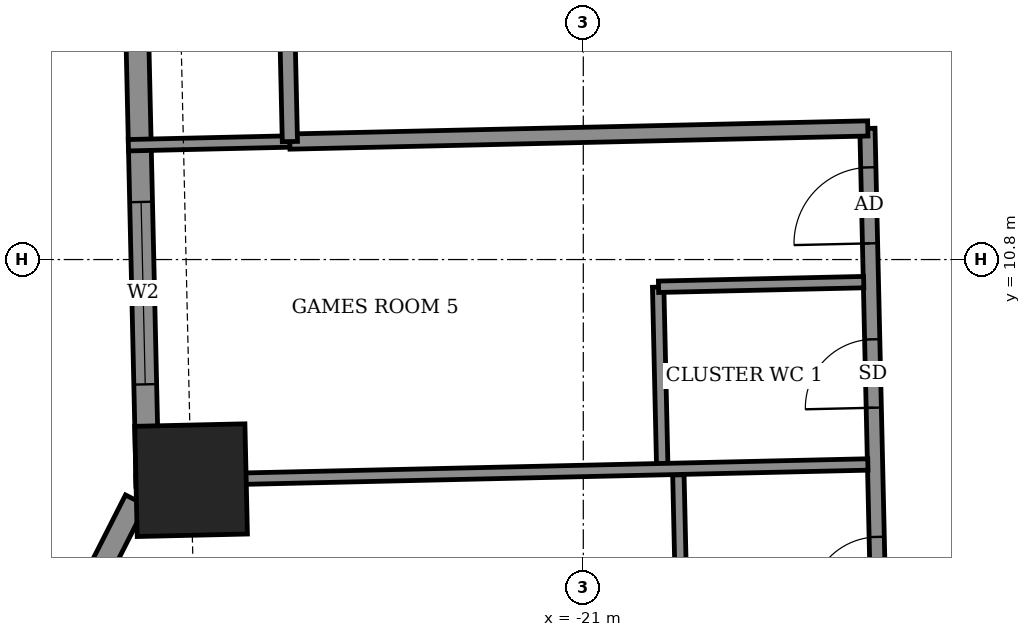
"""IFC4 building model, lengths in metres.
Left out: names, types, materials, properties, quantities, classifications, styles, units other than length and angle.
Written with IfcOpenShell. Run it as: python <this file> out.ifc"""

import sys

from ifc_helpers import new_model, si_unit, direction, frame, frame_2d, origin, origin_2d, place, context, subcontext, project, spatial, rectangle, extrude, element, fill, save


model = new_model("IFC4")
c1 = context("Model", 3, precision=1e-05, world=origin(), true_north=direction((0.0, 1.0)))
c2 = subcontext(c1, "Body", "Model", "MODEL_VIEW")
j1 = project(units=[si_unit("LENGTHUNIT", "METRE"), si_unit("PLANEANGLEUNIT", "RADIAN")], contexts=[c1])
p1 = place(None, origin())
s1 = spatial("IfcSite", under=j1, at=p1, CompositionType="ELEMENT")
p2 = place(p1, origin())
s2 = spatial("IfcBuilding", under=s1, at=p2, CompositionType="ELEMENT")
p3 = place(p2, frame((0.0, 0.0, 79.3)))
s3 = spatial("IfcBuildingStorey", under=s2, at=p3, CompositionType="ELEMENT", Elevation=79.3)
p4 = place(p3, frame((-26.16, 7.897, -0.55), z_axis=(0.0, 0.0, 1.0), x_axis=(0.022675887158, -0.999742869013, 0.0)))
e1 = element("IfcColumn", 1, at=p4, inside=s3, PredefinedType="COLUMN", context=c2, shape_type="SweptSolid", body=[
    extrude(rectangle(XDim=1.45, YDim=1.45, at=origin_2d()), origin(), (0.0, 0.0, 1.0), 3.6),
])
p5 = place(p3, frame((-27.036, 21.155, 0.0), z_axis=(0.0, 0.0, 1.0), x_axis=(0.022730142562, -0.999741636934, 0.0)))
e2 = element("IfcWall", 2, at=p5, inside=s3, PredefinedType="SOLIDWALL", context=c2, shape_type="SweptSolid", body=[
    extrude(rectangle(XDim=13.329, YDim=0.3, at=frame_2d((6.665, 0.0))), origin(), (0.0, 0.0, 1.0), 3.05),
])
p6 = place(p5, frame((2.818, 0.0, 0.0)))
e3 = element("IfcOpeningElement", 3, at=p6, cuts=e2, PredefinedType="OPENING", context=c2, shape_type="SweptSolid", body=[
    extrude(rectangle(XDim=1.5, YDim=2.4, at=frame_2d((0.75, 1.2))), frame((0.0, 0.16, 0.0), z_axis=(0.0, -1.0, 0.0), x_axis=(1.0, 0.0, 0.0)), (0.0, 0.0, 1.0), 0.32),
])
p7 = place(p5, frame((9.6, 0.0, 0.9)))
e4 = element("IfcOpeningElement", 4, at=p7, cuts=e2, PredefinedType="OPENING", context=c2, shape_type="SweptSolid", body=[
    extrude(rectangle(XDim=2.4, YDim=1.5, at=frame_2d((1.2, 0.75))), frame((0.0, 0.16, 0.0), z_axis=(0.0, -1.0, 0.0), x_axis=(1.0, 0.0, 0.0)), (0.0, 0.0, 1.0), 0.32),
])
p8 = place(p3, frame((-26.889, 7.635, 0.0), z_axis=(0.0, 0.0, 1.0), x_axis=(-0.452633159278, -0.891696822425, 0.0)))
e5 = element("IfcWall", 5, at=p8, inside=s3, PredefinedType="SOLIDWALL", context=c2, shape_type="SweptSolid", body=[
    extrude(rectangle(XDim=5.397, YDim=0.3, at=frame_2d((2.699, 0.0))), origin(), (0.0, 0.0, 1.0), 3.05),
])
p9 = place(p8, frame((2.007, 0.0, 0.9)))
e6 = element("IfcOpeningElement", 6, at=p9, cuts=e5, PredefinedType="OPENING", context=c2, shape_type="SweptSolid", body=[
    extrude(rectangle(XDim=1.2, YDim=1.5, at=frame_2d((0.6, 0.75))), frame((0.0, 0.16, 0.0), z_axis=(0.0, -1.0, 0.0), x_axis=(1.0, 0.0, 0.0)), (0.0, 0.0, 1.0), 0.32),
])
p10 = place(p3, frame((-16.684, -12.919, 0.0), z_axis=(0.0, 0.0, 1.0), x_axis=(-0.022706151961, 0.999742182097, 0.0)))
e7 = element("IfcWall", 7, at=p10, inside=s3, PredefinedType="PARTITIONING", context=c2, shape_type="SweptSolid", body=[
    extrude(rectangle(XDim=25.45, YDim=0.2, at=frame_2d((12.725, 0.0))), origin(), (0.0, 0.0, 1.0), 3.05),
])
p11 = place(p10, frame((23.938, 0.0, 0.0)))
e8 = element("IfcOpeningElement", 8, at=p11, cuts=e7, PredefinedType="OPENING", context=c2, shape_type="SweptSolid", body=[
    extrude(rectangle(XDim=1.0, YDim=2.1, at=frame_2d((0.5, 1.05))), frame((0.0, 0.11, 0.0), z_axis=(0.0, -1.0, 0.0), x_axis=(1.0, 0.0, 0.0)), (0.0, 0.0, 1.0), 0.22),
])
p12 = place(p10, frame((21.775, 0.0, 0.0)))
e9 = element("IfcOpeningElement", 9, at=p12, cuts=e7, PredefinedType="OPENING", context=c2, shape_type="SweptSolid", body=[
    extrude(rectangle(XDim=0.9, YDim=2.1, at=frame_2d((0.45, 1.05))), frame((0.0, 0.11, 0.0), z_axis=(0.0, -1.0, 0.0), x_axis=(1.0, 0.0, 0.0)), (0.0, 0.0, 1.0), 0.22),
])
p13 = place(p10, frame((16.825, 0.0, 0.0)))
e10 = element("IfcOpeningElement", 10, at=p13, cuts=e7, PredefinedType="OPENING", context=c2, shape_type="SweptSolid", body=[
    extrude(rectangle(XDim=1.0, YDim=2.1, at=frame_2d((0.5, 1.05))), frame((0.0, 0.11, 0.0), z_axis=(0.0, -1.0, 0.0), x_axis=(1.0, 0.0, 0.0)), (0.0, 0.0, 1.0), 0.22),
])
p14 = place(p10, frame((19.175, 0.0, 0.0)))
e11 = element("IfcOpeningElement", 11, at=p14, cuts=e7, PredefinedType="OPENING", context=c2, shape_type="SweptSolid", body=[
    extrude(rectangle(XDim=0.9, YDim=2.1, at=frame_2d((0.45, 1.05))), frame((0.0, 0.11, 0.0), z_axis=(0.0, -1.0, 0.0), x_axis=(1.0, 0.0, 0.0)), (0.0, 0.0, 1.0), 0.22),
])
p15 = place(p10, frame((14.9, 0.0, 0.0)))
e12 = element("IfcOpeningElement", 12, at=p15, cuts=e7, PredefinedType="OPENING", context=c2, shape_type="SweptSolid", body=[
    extrude(rectangle(XDim=1.0, YDim=2.1, at=frame_2d((0.5, 1.05))), frame((0.0, 0.11, 0.0), z_axis=(0.0, -1.0, 0.0), x_axis=(1.0, 0.0, 0.0)), (0.0, 0.0, 1.0), 0.22),
])
p16 = place(p10, frame((12.625, 0.0, 0.0)))
e13 = element("IfcOpeningElement", 13, at=p16, cuts=e7, PredefinedType="OPENING", context=c2, shape_type="SweptSolid", body=[
    extrude(rectangle(XDim=0.9, YDim=2.1, at=frame_2d((0.45, 1.05))), frame((0.0, 0.11, 0.0), z_axis=(0.0, -1.0, 0.0), x_axis=(1.0, 0.0, 0.0)), (0.0, 0.0, 1.0), 0.22),
])
p17 = place(p10, frame((10.225, 0.0, 0.0)))
e14 = element("IfcOpeningElement", 14, at=p17, cuts=e7, PredefinedType="OPENING", context=c2, shape_type="SweptSolid", body=[
    extrude(rectangle(XDim=1.0, YDim=2.1, at=frame_2d((0.5, 1.05))), frame((0.0, 0.11, 0.0), z_axis=(0.0, -1.0, 0.0), x_axis=(1.0, 0.0, 0.0)), (0.0, 0.0, 1.0), 0.22),
])
p18 = place(p10, frame((8.025, 0.0, 0.0)))
e15 = element("IfcOpeningElement", 15, at=p18, cuts=e7, PredefinedType="OPENING", context=c2, shape_type="SweptSolid", body=[
    extrude(rectangle(XDim=0.9, YDim=2.1, at=frame_2d((0.45, 1.05))), frame((0.0, 0.11, 0.0), z_axis=(0.0, -1.0, 0.0), x_axis=(1.0, 0.0, 0.0)), (0.0, 0.0, 1.0), 0.22),
])
p19 = place(p10, frame((5.262, 0.0, 0.0)))
e16 = element("IfcOpeningElement", 16, at=p19, cuts=e7, PredefinedType="OPENING", context=c2, shape_type="SweptSolid", body=[
    extrude(rectangle(XDim=1.0, YDim=2.1, at=frame_2d((0.5, 1.05))), frame((0.0, 0.11, 0.0), z_axis=(0.0, -1.0, 0.0), x_axis=(1.0, 0.0, 0.0)), (0.0, 0.0, 1.0), 0.22),
])
p20 = place(p10, frame((2.825, 0.0, 0.0)))
e17 = element("IfcOpeningElement", 17, at=p20, cuts=e7, PredefinedType="OPENING", context=c2, shape_type="SweptSolid", body=[
    extrude(rectangle(XDim=1.0, YDim=2.1, at=frame_2d((0.5, 1.05))), frame((0.0, 0.11, 0.0), z_axis=(0.0, -1.0, 0.0), x_axis=(1.0, 0.0, 0.0)), (0.0, 0.0, 1.0), 0.22),
])
p21 = place(p10, frame((0.75, 0.0, 0.0)))
e18 = element("IfcOpeningElement", 18, at=p21, cuts=e7, PredefinedType="OPENING", context=c2, shape_type="SweptSolid", body=[
    extrude(rectangle(XDim=0.9, YDim=2.1, at=frame_2d((0.45, 1.05))), frame((0.0, 0.11, 0.0), z_axis=(0.0, -1.0, 0.0), x_axis=(1.0, 0.0, 0.0)), (0.0, 0.0, 1.0), 0.22),
])
p22 = place(p3, frame((-19.687, 5.243, 0.0), z_axis=(0.0, 0.0, 1.0), x_axis=(-0.022758040381, 0.999741002259, 0.0)))
e19 = element("IfcWall", 19, at=p22, inside=s3, PredefinedType="PARTITIONING", context=c2, shape_type="SweptSolid", body=[
    extrude(rectangle(XDim=2.725, YDim=0.15, at=frame_2d((1.362, 0.0))), origin(), (0.0, 0.0, 1.0), 3.05),
])
p23 = place(p3, frame((-19.962, 8.112, 0.0), z_axis=(0.0, 0.0, 1.0), x_axis=(-0.022781023197, 0.999740478815, 0.0)))
e20 = element("IfcWall", 20, at=p23, inside=s3, PredefinedType="PARTITIONING", context=c2, shape_type="SweptSolid", body=[
    extrude(rectangle(XDim=2.325, YDim=0.15, at=frame_2d((1.163, 0.0))), origin(), (0.0, 0.0, 1.0), 3.05),
])
p24 = place(p3, frame((-26.885, 7.885, 0.0), z_axis=(0.0, 0.0, 1.0), x_axis=(0.999741468995, 0.022737527832, 0.0)))
e21 = element("IfcWall", 21, at=p24, inside=s3, PredefinedType="PARTITIONING", context=c2, shape_type="SweptSolid", body=[
    extrude(rectangle(XDim=9.631, YDim=0.15, at=frame_2d((4.816, 0.0))), origin(), (0.0, 0.0, 1.0), 3.05),
])
p25 = place(p3, frame((-20.01, 10.442, 0.0), z_axis=(0.0, 0.0, 1.0), x_axis=(0.999744396973, 0.02260842146, 0.0)))
e22 = element("IfcWall", 22, at=p25, inside=s3, PredefinedType="PARTITIONING", context=c2, shape_type="SweptSolid", body=[
    extrude(rectangle(XDim=2.7, YDim=0.15, at=frame_2d((1.35, 0.0))), origin(), (0.0, 0.0, 1.0), 3.05),
])
p26 = place(p3, frame((-26.985, 12.304, 0.0), z_axis=(0.0, 0.0, 1.0), x_axis=(0.99973426125, 0.02305226414, 0.0)))
e23 = element("IfcWall", 23, at=p26, inside=s3, PredefinedType="PARTITIONING", context=c2, shape_type="SweptSolid", body=[
    extrude(rectangle(XDim=2.129, YDim=0.15, at=frame_2d((1.064, 0.0))), origin(), (0.0, 0.0, 1.0), 2.55),
])
p27 = place(p3, frame((-24.861, 12.352, 0.0), z_axis=(0.0, 0.0, 1.0), x_axis=(0.999741736108, 0.02272578017, 0.0)))
e24 = element("IfcWall", 24, at=p27, inside=s3, PredefinedType="PARTITIONING", context=c2, shape_type="SweptSolid", body=[
    extrude(rectangle(XDim=7.606, YDim=0.2, at=frame_2d((3.803, 0.0))), origin(), (0.0, 0.0, 1.0), 3.05),
])
p28 = place(p3, frame((-24.86, 12.352, 0.0), z_axis=(0.0, 0.0, 1.0), x_axis=(-0.022617910375, 0.999744182344, 0.0)))
e25 = element("IfcWall", 25, at=p28, inside=s3, PredefinedType="PARTITIONING", context=c2, shape_type="SweptSolid", body=[
    extrude(rectangle(XDim=1.5, YDim=0.2, at=frame_2d((0.75, 0.0))), origin(), (0.0, 0.0, 1.0), 3.05),
])
p29 = place(p7, origin())
e26 = element("IfcWindow", 26, at=p29, inside=s3, PartitioningType="DOUBLE_PANEL_VERTICAL", PredefinedType="WINDOW", context=c2, shape_type="SweptSolid", body=[
    extrude(rectangle(XDim=2.4, YDim=1.5, at=frame_2d((1.2, 0.75))), frame((0.0, 0.03, 0.0), z_axis=(0.0, -1.0, 0.0), x_axis=(1.0, 0.0, 0.0)), (0.0, 0.0, 1.0), 0.06),
])
fill(e4, e26)
p30 = place(p11, origin())
e27 = element("IfcDoor", 27, at=p30, inside=s3, OperationType="SINGLE_SWING_LEFT", PredefinedType="DOOR", context=c2, shape_type="SweptSolid", body=[
    extrude(rectangle(XDim=1.0, YDim=2.1, at=frame_2d((0.5, 1.05))), frame((0.0, 0.025, 0.0), z_axis=(0.0, -1.0, 0.0), x_axis=(1.0, 0.0, 0.0)), (0.0, 0.0, 1.0), 0.05),
])
fill(e8, e27)
p31 = place(p12, origin())
e28 = element("IfcDoor", 28, at=p31, inside=s3, OperationType="SINGLE_SWING_LEFT", PredefinedType="DOOR", context=c2, shape_type="SweptSolid", body=[
    extrude(rectangle(XDim=0.9, YDim=2.1, at=frame_2d((0.45, 1.05))), frame((0.0, 0.025, 0.0), z_axis=(0.0, -1.0, 0.0), x_axis=(1.0, 0.0, 0.0)), (0.0, 0.0, 1.0), 0.05),
])
fill(e9, e28)
p32 = place(p14, origin())
e29 = element("IfcDoor", 29, at=p32, inside=s3, OperationType="SINGLE_SWING_RIGHT", PredefinedType="DOOR", context=c2, shape_type="SweptSolid", body=[
    extrude(rectangle(XDim=0.9, YDim=2.1, at=frame_2d((0.45, 1.05))), frame((0.0, 0.025, 0.0), z_axis=(0.0, -1.0, 0.0), x_axis=(1.0, 0.0, 0.0)), (0.0, 0.0, 1.0), 0.05),
])
fill(e11, e29)
save(model, sys.argv[1])
